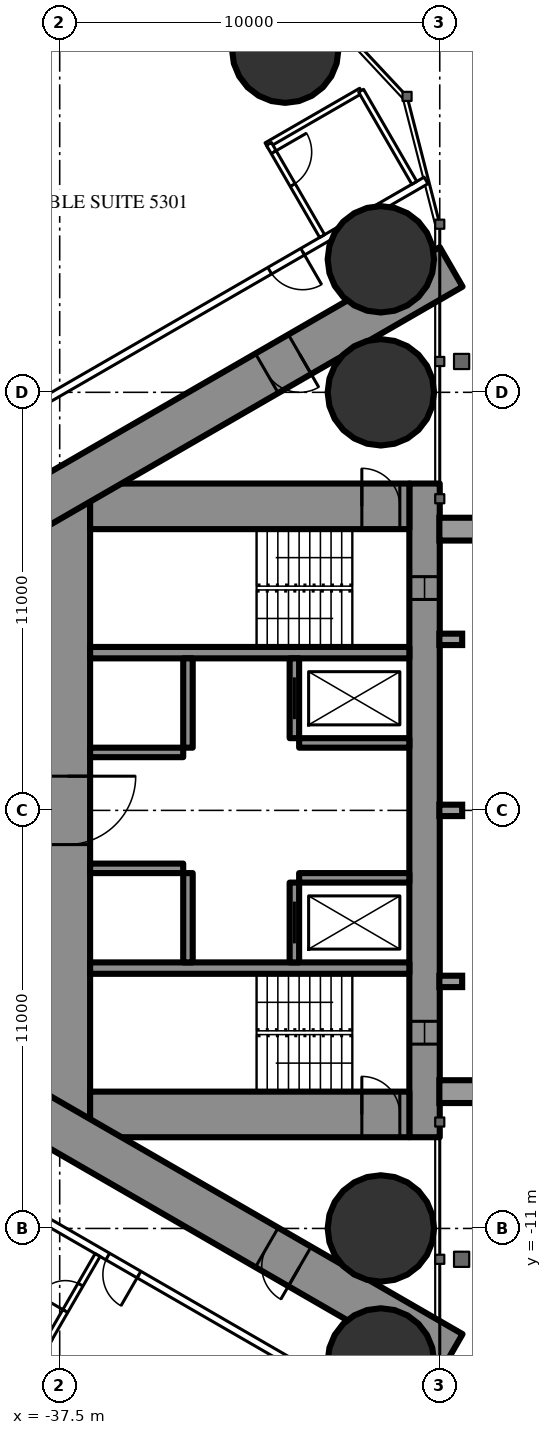
"""IFC4 building model, lengths in metres.
Left out: names, types, materials, properties, quantities, classifications, styles, units other than length and angle.
Written with IfcOpenShell. Run it as: python <this file> out.ifc"""

import sys

from ifc_helpers import new_model, si_unit, direction, frame, frame_2d, origin, origin_2d, place, context, subcontext, project, spatial, rectangle, circle, extrude, element, fill, save


model = new_model("IFC4")
c1 = context("Model", 3, precision=1e-05, world=origin(), true_north=direction((0.0, 1.0)))
c2 = subcontext(c1, "Body", "Model", "MODEL_VIEW")
j1 = project(units=[si_unit("LENGTHUNIT", "METRE"), si_unit("PLANEANGLEUNIT", "RADIAN")], contexts=[c1])
p1 = place(None, origin())
s1 = spatial("IfcSite", under=j1, at=p1, CompositionType="ELEMENT")
p2 = place(p1, origin())
s2 = spatial("IfcBuilding", under=s1, at=p2, CompositionType="ELEMENT")
p3 = place(p2, frame((0.0, 0.0, 198.3)))
s3 = spatial("IfcBuildingStorey", under=s2, at=p3, CompositionType="ELEMENT", Elevation=198.3)
for number, where, z_axis, x_axis in (
    (1, (-31.565, 20.016, 0.0), (0.0, 0.0, 1.0), (1.0, 0.0, 0.0)),
    (2, (-29.05, -11.0, 0.0), (0.0, 0.0, 1.0), (1.0, 0.0, 0.0)),
    (3, (-29.05, 11.0, 0.0), (0.0, 0.0, 1.0), (1.0, 0.0, 0.0)),
    (4, (-29.05, 14.5, 0.0), (0.0, 0.0, 1.0), (1.0, 0.0, 0.0)),
    (5, (-29.05, -14.5, 0.0), (0.0, 0.0, 1.0), (1.0, 0.0, 0.0)),
):
    element("IfcColumn", number, at=place(p3, frame(where, z_axis=z_axis, x_axis=x_axis)), inside=s3, PredefinedType="COLUMN", context=c2, shape_type="SweptSolid", body=[
        extrude(circle(Radius=1.4, at=origin_2d()), origin(), (0.0, 0.0, 1.0), 3.5),
    ])
p4 = place(p3, frame((-27.9, 8.6, 0.0), z_axis=(0.0, 0.0, 1.0), x_axis=(0.0, -1.0, 0.0)))
e6 = element("IfcWall", 6, at=p4, inside=s3, PredefinedType="SHEAR", context=c2, shape_type="SweptSolid", body=[
    extrude(rectangle(XDim=17.2, YDim=0.8, at=frame_2d((8.6, 0.0))), origin(), (0.0, 0.0, 1.0), 3.5),
])
p5 = place(p4, frame((2.45, 0.0, 0.6)))
e7 = element("IfcOpeningElement", 7, at=p5, cuts=e6, PredefinedType="OPENING", context=c2, shape_type="SweptSolid", body=[
    extrude(rectangle(XDim=0.6, YDim=2.1, at=frame_2d((0.3, 1.05))), frame((0.0, 0.41, 0.0), z_axis=(0.0, -1.0, 0.0), x_axis=(1.0, 0.0, 0.0)), (0.0, 0.0, 1.0), 0.82),
])
p6 = place(p4, frame((14.15, 0.0, 0.6)))
e8 = element("IfcOpeningElement", 8, at=p6, cuts=e6, PredefinedType="OPENING", context=c2, shape_type="SweptSolid", body=[
    extrude(rectangle(XDim=0.6, YDim=2.1, at=frame_2d((0.3, 1.05))), frame((0.0, 0.41, 0.0), z_axis=(0.0, -1.0, 0.0), x_axis=(1.0, 0.0, 0.0)), (0.0, 0.0, 1.0), 0.82),
])
p7 = place(p3, frame((-37.3, 8.6, 0.0), z_axis=(0.0, 0.0, 1.0), x_axis=(0.0, -1.0, 0.0)))
e9 = element("IfcWall", 9, at=p7, inside=s3, PredefinedType="SHEAR", context=c2, shape_type="SweptSolid", body=[
    extrude(rectangle(XDim=17.2, YDim=1.2, at=frame_2d((8.6, 0.0))), origin(), (0.0, 0.0, 1.0), 3.5),
])
p8 = place(p7, frame((7.7, 0.0, 0.0)))
e10 = element("IfcOpeningElement", 10, at=p8, cuts=e9, PredefinedType="OPENING", context=c2, shape_type="SweptSolid", body=[
    extrude(rectangle(XDim=1.8, YDim=2.2, at=frame_2d((0.9, 1.1))), frame((0.0, 0.61, 0.0), z_axis=(0.0, -1.0, 0.0), x_axis=(1.0, 0.0, 0.0)), (0.0, 0.0, 1.0), 1.22),
])
p9 = place(p3, frame((-28.3, 8.0, 0.0), z_axis=(0.0, 0.0, 1.0), x_axis=(-1.0, 0.0, 0.0)))
e11 = element("IfcWall", 11, at=p9, inside=s3, PredefinedType="SHEAR", context=c2, shape_type="SweptSolid", body=[
    extrude(rectangle(XDim=8.4, YDim=1.2, at=frame_2d((4.2, 0.0))), origin(), (0.0, 0.0, 1.0), 3.5),
])
p10 = place(p9, frame((0.25, 0.0, 0.0)))
e12 = element("IfcOpeningElement", 12, at=p10, cuts=e11, PredefinedType="OPENING", context=c2, shape_type="SweptSolid", body=[
    extrude(rectangle(XDim=1.0, YDim=2.2, at=frame_2d((0.5, 1.1))), frame((0.0, 0.61, 0.0), z_axis=(0.0, -1.0, 0.0), x_axis=(1.0, 0.0, 0.0)), (0.0, 0.0, 1.0), 1.22),
])
p11 = place(p3, frame((-28.3, -8.0, 0.0), z_axis=(0.0, 0.0, 1.0), x_axis=(-1.0, 0.0, 0.0)))
e13 = element("IfcWall", 13, at=p11, inside=s3, PredefinedType="SHEAR", context=c2, shape_type="SweptSolid", body=[
    extrude(rectangle(XDim=8.4, YDim=1.2, at=frame_2d((4.2, 0.0))), origin(), (0.0, 0.0, 1.0), 3.5),
])
p12 = place(p11, frame((0.25, 0.0, 0.0)))
e14 = element("IfcOpeningElement", 14, at=p12, cuts=e13, PredefinedType="OPENING", context=c2, shape_type="SweptSolid", body=[
    extrude(rectangle(XDim=1.0, YDim=2.2, at=frame_2d((0.5, 1.1))), frame((0.0, 0.61, 0.0), z_axis=(0.0, -1.0, 0.0), x_axis=(1.0, 0.0, 0.0)), (0.0, 0.0, 1.0), 1.22),
])
for number, where, z_axis, x_axis in (
    (15, (-28.3, 4.15, 0.0), (0.0, 0.0, 1.0), (-1.0, 0.0, 0.0)),
    (16, (-28.3, -4.15, 0.0), (0.0, 0.0, 1.0), (-1.0, 0.0, 0.0)),
):
    element("IfcWall", number, at=place(p3, frame(where, z_axis=z_axis, x_axis=x_axis)), inside=s3, PredefinedType="SHEAR", context=c2, shape_type="SweptSolid", body=[
        extrude(rectangle(XDim=8.4, YDim=0.3, at=frame_2d((4.2, 0.0))), origin(), (0.0, 0.0, 1.0), 3.5),
    ])
p13 = place(p3, frame((-31.325, 4.0, 0.0), z_axis=(0.0, 0.0, 1.0), x_axis=(0.0, -1.0, 0.0)))
e17 = element("IfcWall", 17, at=p13, inside=s3, PredefinedType="SHEAR", context=c2, shape_type="SweptSolid", body=[
    extrude(rectangle(XDim=2.1, YDim=0.25, at=frame_2d((1.05, 0.0))), origin(), (0.0, 0.0, 1.0), 3.5),
])
p14 = place(p13, frame((0.5, 0.0, 0.0)))
e18 = element("IfcOpeningElement", 18, at=p14, cuts=e17, PredefinedType="OPENING", context=c2, shape_type="SweptSolid", body=[
    extrude(rectangle(XDim=1.1, YDim=2.2, at=frame_2d((0.55, 1.1))), frame((0.0, 0.135, 0.0), z_axis=(0.0, -1.0, 0.0), x_axis=(1.0, 0.0, 0.0)), (0.0, 0.0, 1.0), 0.27),
])
p15 = place(p3, frame((-34.125, 4.0, 0.0), z_axis=(0.0, 0.0, 1.0), x_axis=(0.0, -1.0, 0.0)))
e19 = element("IfcWall", 19, at=p15, inside=s3, PredefinedType="SHEAR", context=c2, shape_type="SweptSolid", body=[
    extrude(rectangle(XDim=2.35, YDim=0.25, at=frame_2d((1.175, 0.0))), origin(), (0.0, 0.0, 1.0), 3.5),
])
p16 = place(p3, frame((-28.3, 1.775, 0.0), z_axis=(0.0, 0.0, 1.0), x_axis=(-1.0, 0.0, 0.0)))
e20 = element("IfcWall", 20, at=p16, inside=s3, PredefinedType="SHEAR", context=c2, shape_type="SweptSolid", body=[
    extrude(rectangle(XDim=2.9, YDim=0.25, at=frame_2d((1.45, 0.0))), origin(), (0.0, 0.0, 1.0), 3.5),
])
p17 = place(p3, frame((-34.25, 1.525, 0.0), z_axis=(0.0, 0.0, 1.0), x_axis=(-1.0, 0.0, 0.0)))
e21 = element("IfcWall", 21, at=p17, inside=s3, PredefinedType="SHEAR", context=c2, shape_type="SweptSolid", body=[
    extrude(rectangle(XDim=2.45, YDim=0.25, at=frame_2d((1.225, 0.0))), origin(), (0.0, 0.0, 1.0), 3.5),
])
p18 = place(p3, frame((-31.325, -1.9, 0.0), z_axis=(0.0, 0.0, 1.0), x_axis=(0.0, -1.0, 0.0)))
e22 = element("IfcWall", 22, at=p18, inside=s3, PredefinedType="SHEAR", context=c2, shape_type="SweptSolid", body=[
    extrude(rectangle(XDim=2.1, YDim=0.25, at=frame_2d((1.05, 0.0))), origin(), (0.0, 0.0, 1.0), 3.5),
])
p19 = place(p18, frame((0.5, 0.0, 0.0)))
e23 = element("IfcOpeningElement", 23, at=p19, cuts=e22, PredefinedType="OPENING", context=c2, shape_type="SweptSolid", body=[
    extrude(rectangle(XDim=1.1, YDim=2.2, at=frame_2d((0.55, 1.1))), frame((0.0, 0.135, 0.0), z_axis=(0.0, -1.0, 0.0), x_axis=(1.0, 0.0, 0.0)), (0.0, 0.0, 1.0), 0.27),
])
p20 = place(p3, frame((-34.125, -1.65, 0.0), z_axis=(0.0, 0.0, 1.0), x_axis=(0.0, -1.0, 0.0)))
e24 = element("IfcWall", 24, at=p20, inside=s3, PredefinedType="SHEAR", context=c2, shape_type="SweptSolid", body=[
    extrude(rectangle(XDim=2.35, YDim=0.25, at=frame_2d((1.175, 0.0))), origin(), (0.0, 0.0, 1.0), 3.5),
])
p21 = place(p3, frame((-28.3, -1.775, 0.0), z_axis=(0.0, 0.0, 1.0), x_axis=(-1.0, 0.0, 0.0)))
e25 = element("IfcWall", 25, at=p21, inside=s3, PredefinedType="SHEAR", context=c2, shape_type="SweptSolid", body=[
    extrude(rectangle(XDim=2.9, YDim=0.25, at=frame_2d((1.45, 0.0))), origin(), (0.0, 0.0, 1.0), 3.5),
])
p22 = place(p3, frame((-34.25, -1.525, 0.0), z_axis=(0.0, 0.0, 1.0), x_axis=(-1.0, 0.0, 0.0)))
e26 = element("IfcWall", 26, at=p22, inside=s3, PredefinedType="SHEAR", context=c2, shape_type="SweptSolid", body=[
    extrude(rectangle(XDim=2.45, YDim=0.25, at=frame_2d((1.225, 0.0))), origin(), (0.0, 0.0, 1.0), 3.5),
])
p23 = place(p3, frame((-27.2, 14.3, 0.0), z_axis=(0.0, 0.0, 1.0), x_axis=(-0.866026593062, -0.499997940104, 0.0)))
e27 = element("IfcWall", 27, at=p23, inside=s3, PredefinedType="SHEAR", context=c2, shape_type="SweptSolid", body=[
    extrude(rectangle(XDim=28.946, YDim=1.2, at=frame_2d((14.473, 0.0))), origin(), (0.0, 0.0, 1.0), 3.5),
])
p24 = place(p23, frame((4.6, 0.0, 0.0)))
e28 = element("IfcOpeningElement", 28, at=p24, cuts=e27, PredefinedType="OPENING", context=c2, shape_type="SweptSolid", body=[
    extrude(rectangle(XDim=1.0, YDim=2.2, at=frame_2d((0.5, 1.1))), frame((0.0, 0.61, 0.0), z_axis=(0.0, -1.0, 0.0), x_axis=(1.0, 0.0, 0.0)), (0.0, 0.0, 1.0), 1.22),
])
p25 = place(p23, frame((13.395, 0.0, 0.0)))
e29 = element("IfcOpeningElement", 29, at=p25, cuts=e27, PredefinedType="OPENING", context=c2, shape_type="SweptSolid", body=[
    extrude(rectangle(XDim=1.8, YDim=2.2, at=frame_2d((0.9, 1.1))), frame((0.0, 0.61, 0.0), z_axis=(0.0, -1.0, 0.0), x_axis=(1.0, 0.0, 0.0)), (0.0, 0.0, 1.0), 1.22),
])
p26 = place(p3, frame((-27.2, -14.3, 0.0), z_axis=(0.0, 0.0, 1.0), x_axis=(-0.866024021859, 0.500002393557, 0.0)))
e30 = element("IfcWall", 30, at=p26, inside=s3, PredefinedType="SHEAR", context=c2, shape_type="SweptSolid", body=[
    extrude(rectangle(XDim=27.907, YDim=1.2, at=frame_2d((13.954, 0.0))), origin(), (0.0, 0.0, 1.0), 3.5),
])
p27 = place(p26, frame((4.6, 0.0, 0.0)))
e31 = element("IfcOpeningElement", 31, at=p27, cuts=e30, PredefinedType="OPENING", context=c2, shape_type="SweptSolid", body=[
    extrude(rectangle(XDim=1.0, YDim=2.2, at=frame_2d((0.5, 1.1))), frame((0.0, 0.61, 0.0), z_axis=(0.0, -1.0, 0.0), x_axis=(1.0, 0.0, 0.0)), (0.0, 0.0, 1.0), 1.22),
])
p28 = place(p26, frame((13.395, 0.0, 0.0)))
e32 = element("IfcOpeningElement", 32, at=p28, cuts=e30, PredefinedType="OPENING", context=c2, shape_type="SweptSolid", body=[
    extrude(rectangle(XDim=1.8, YDim=2.2, at=frame_2d((0.9, 1.1))), frame((0.0, 0.61, 0.0), z_axis=(0.0, -1.0, 0.0), x_axis=(1.0, 0.0, 0.0)), (0.0, 0.0, 1.0), 1.22),
])
p29 = place(p3, frame((-27.86, 16.575, 0.0), z_axis=(0.0, 0.0, 1.0), x_axis=(-0.866025533911, -0.499999774615, 0.0)))
e33 = element("IfcWall", 33, at=p29, inside=s3, PredefinedType="PARTITIONING", context=c2, shape_type="SweptSolid", body=[
    extrude(rectangle(XDim=33.149, YDim=0.2, at=frame_2d((16.575, 0.0))), origin(), (0.0, 0.0, 1.0), 3.25),
])
p30 = place(p29, frame((3.75, 0.0, 0.0)))
e34 = element("IfcOpeningElement", 34, at=p30, cuts=e33, PredefinedType="OPENING", context=c2, shape_type="SweptSolid", body=[
    extrude(rectangle(XDim=1.0, YDim=2.2, at=frame_2d((0.5, 1.1))), frame((0.0, 0.11, 0.0), z_axis=(0.0, -1.0, 0.0), x_axis=(1.0, 0.0, 0.0)), (0.0, 0.0, 1.0), 0.22),
])
p31 = place(p29, frame((16.402, 0.0, 0.0)))
e35 = element("IfcOpeningElement", 35, at=p31, cuts=e33, PredefinedType="OPENING", context=c2, shape_type="SweptSolid", body=[
    extrude(rectangle(XDim=0.95, YDim=2.2, at=frame_2d((0.475, 1.1))), frame((0.0, 0.11, 0.0), z_axis=(0.0, -1.0, 0.0), x_axis=(1.0, 0.0, 0.0)), (0.0, 0.0, 1.0), 0.22),
])
p32 = place(p29, frame((22.047, 0.0, 0.0)))
e36 = element("IfcOpeningElement", 36, at=p32, cuts=e33, PredefinedType="OPENING", context=c2, shape_type="SweptSolid", body=[
    extrude(rectangle(XDim=0.95, YDim=2.2, at=frame_2d((0.475, 1.1))), frame((0.0, 0.11, 0.0), z_axis=(0.0, -1.0, 0.0), x_axis=(1.0, 0.0, 0.0)), (0.0, 0.0, 1.0), 0.22),
])
p33 = place(p29, frame((30.396, 0.0, 0.0)))
e37 = element("IfcOpeningElement", 37, at=p33, cuts=e33, PredefinedType="OPENING", context=c2, shape_type="SweptSolid", body=[
    extrude(rectangle(XDim=1.8, YDim=2.2, at=frame_2d((0.9, 1.1))), frame((0.0, 0.11, 0.0), z_axis=(0.0, -1.0, 0.0), x_axis=(1.0, 0.0, 0.0)), (0.0, 0.0, 1.0), 0.22),
])
p34 = place(p3, frame((-27.86, -16.575, 0.0), z_axis=(0.0, 0.0, 1.0), x_axis=(-0.866027756871, 0.499995924312, 0.0)))
e38 = element("IfcWall", 38, at=p34, inside=s3, PredefinedType="PARTITIONING", context=c2, shape_type="SweptSolid", body=[
    extrude(rectangle(XDim=12.622, YDim=0.2, at=frame_2d((6.311, 0.0))), origin(), (0.0, 0.0, 1.0), 3.25),
])
p35 = place(p34, frame((8.722, 0.0, 0.0)))
e39 = element("IfcOpeningElement", 39, at=p35, cuts=e38, PredefinedType="OPENING", context=c2, shape_type="SweptSolid", body=[
    extrude(rectangle(XDim=0.95, YDim=2.2, at=frame_2d((0.475, 1.1))), frame((0.0, 0.11, 0.0), z_axis=(0.0, -1.0, 0.0), x_axis=(1.0, 0.0, 0.0)), (0.0, 0.0, 1.0), 0.22),
])
p36 = place(p3, frame((-29.57, 18.936, 0.0), z_axis=(0.0, 0.0, 1.0), x_axis=(-0.866018712932, -0.500011588718, 0.0)))
e40 = element("IfcWall", 40, at=p36, inside=s3, PredefinedType="PARTITIONING", context=c2, shape_type="SweptSolid", body=[
    extrude(rectangle(XDim=2.875, YDim=0.15, at=frame_2d((1.438, 0.0))), origin(), (0.0, 0.0, 1.0), 3.25),
])
p37 = place(p3, frame((-30.595, 15.111, 0.0), z_axis=(0.0, 0.0, 1.0), x_axis=(-0.49998411664, 0.866034573852, 0.0)))
e41 = element("IfcWall", 41, at=p37, inside=s3, PredefinedType="PARTITIONING", context=c2, shape_type="SweptSolid", body=[
    extrude(rectangle(XDim=2.8, YDim=0.15, at=frame_2d((1.4, 0.0))), origin(), (0.0, 0.0, 1.0), 3.25),
])
p38 = place(p37, frame((1.55, 0.0, 0.0)))
e42 = element("IfcOpeningElement", 42, at=p38, cuts=e41, PredefinedType="OPENING", context=c2, shape_type="SweptSolid", body=[
    extrude(rectangle(XDim=1.0, YDim=2.2, at=frame_2d((0.5, 1.1))), frame((0.0, 0.085, 0.0), z_axis=(0.0, -1.0, 0.0), x_axis=(1.0, 0.0, 0.0)), (0.0, 0.0, 1.0), 0.17),
])
p39 = place(p3, frame((-28.17, 16.511, 0.0), z_axis=(0.0, 0.0, 1.0), x_axis=(-0.49994636267, 0.866056369097, 0.0)))
e43 = element("IfcWall", 43, at=p39, inside=s3, PredefinedType="PARTITIONING", context=c2, shape_type="SweptSolid", body=[
    extrude(rectangle(XDim=2.8, YDim=0.15, at=frame_2d((1.4, 0.0))), origin(), (0.0, 0.0, 1.0), 3.25),
])
p40 = place(p3, frame((-36.503, -11.7, 0.0), z_axis=(0.0, 0.0, 1.0), x_axis=(-0.500006934395, -0.866021400173, 0.0)))
e44 = element("IfcWall", 44, at=p40, inside=s3, PredefinedType="PARTITIONING", context=c2, shape_type="SweptSolid", body=[
    extrude(rectangle(XDim=2.6, YDim=0.15, at=frame_2d((1.3, 0.0))), origin(), (0.0, 0.0, 1.0), 3.25),
])
p41 = place(p40, frame((0.9, 0.0, 0.0)))
e45 = element("IfcOpeningElement", 45, at=p41, cuts=e44, PredefinedType="OPENING", context=c2, shape_type="SweptSolid", body=[
    extrude(rectangle(XDim=0.8, YDim=2.2, at=frame_2d((0.4, 1.1))), frame((0.0, 0.085, 0.0), z_axis=(0.0, -1.0, 0.0), x_axis=(1.0, 0.0, 0.0)), (0.0, 0.0, 1.0), 0.17),
])
p42 = place(p38, origin())
e46 = element("IfcDoor", 46, at=p42, inside=s3, OperationType="SINGLE_SWING_RIGHT", PredefinedType="DOOR", context=c2, shape_type="SweptSolid", body=[
    extrude(rectangle(XDim=1.0, YDim=2.2, at=frame_2d((0.5, 1.1))), frame((0.0, 0.025, 0.0), z_axis=(0.0, -1.0, 0.0), x_axis=(1.0, 0.0, 0.0)), (0.0, 0.0, 1.0), 0.05),
])
fill(e42, e46)
p43 = place(p30, origin())
e47 = element("IfcDoor", 47, at=p43, inside=s3, OperationType="SINGLE_SWING_LEFT", PredefinedType="DOOR", context=c2, shape_type="SweptSolid", body=[
    extrude(rectangle(XDim=1.0, YDim=2.2, at=frame_2d((0.5, 1.1))), frame((0.0, 0.025, 0.0), z_axis=(0.0, -1.0, 0.0), x_axis=(1.0, 0.0, 0.0)), (0.0, 0.0, 1.0), 0.05),
])
fill(e34, e47)
p44 = place(p41, origin())
e48 = element("IfcDoor", 48, at=p44, inside=s3, OperationType="SINGLE_SWING_RIGHT", PredefinedType="DOOR", context=c2, shape_type="SweptSolid", body=[
    extrude(rectangle(XDim=0.8, YDim=2.2, at=frame_2d((0.4, 1.1))), frame((0.0, 0.025, 0.0), z_axis=(0.0, -1.0, 0.0), x_axis=(1.0, 0.0, 0.0)), (0.0, 0.0, 1.0), 0.05),
])
fill(e45, e48)
p45 = place(p35, origin())
e49 = element("IfcDoor", 49, at=p45, inside=s3, OperationType="SINGLE_SWING_LEFT", PredefinedType="DOOR", context=c2, shape_type="SweptSolid", body=[
    extrude(rectangle(XDim=0.95, YDim=2.2, at=frame_2d((0.475, 1.1))), frame((0.0, 0.025, 0.0), z_axis=(0.0, -1.0, 0.0), x_axis=(1.0, 0.0, 0.0)), (0.0, 0.0, 1.0), 0.05),
])
fill(e39, e49)
p46 = place(p24, origin())
e50 = element("IfcDoor", 50, at=p46, inside=s3, OperationType="SINGLE_SWING_LEFT", PredefinedType="DOOR", context=c2, shape_type="SweptSolid", body=[
    extrude(rectangle(XDim=1.0, YDim=2.2, at=frame_2d((0.5, 1.1))), frame((0.0, 0.025, 0.0), z_axis=(0.0, -1.0, 0.0), x_axis=(1.0, 0.0, 0.0)), (0.0, 0.0, 1.0), 0.05),
])
fill(e28, e50)
p47 = place(p27, origin())
e51 = element("IfcDoor", 51, at=p47, inside=s3, OperationType="SINGLE_SWING_LEFT", PredefinedType="DOOR", context=c2, shape_type="SweptSolid", body=[
    extrude(rectangle(XDim=1.0, YDim=2.2, at=frame_2d((0.5, 1.1))), frame((0.0, 0.025, 0.0), z_axis=(0.0, -1.0, 0.0), x_axis=(1.0, 0.0, 0.0)), (0.0, 0.0, 1.0), 0.05),
])
fill(e31, e51)
p48 = place(p8, origin())
e52 = element("IfcDoor", 52, at=p48, inside=s3, OperationType="DOUBLE_DOOR_SINGLE_SWING", PredefinedType="DOOR", context=c2, shape_type="SweptSolid", body=[
    extrude(rectangle(XDim=1.8, YDim=2.2, at=frame_2d((0.9, 1.1))), frame((0.0, 0.025, 0.0), z_axis=(0.0, -1.0, 0.0), x_axis=(1.0, 0.0, 0.0)), (0.0, 0.0, 1.0), 0.05),
])
fill(e10, e52)
p49 = place(p10, origin())
e53 = element("IfcDoor", 53, at=p49, inside=s3, OperationType="SINGLE_SWING_RIGHT", PredefinedType="DOOR", context=c2, shape_type="SweptSolid", body=[
    extrude(rectangle(XDim=1.0, YDim=2.2, at=frame_2d((0.5, 1.1))), frame((0.0, 0.025, 0.0), z_axis=(0.0, -1.0, 0.0), x_axis=(1.0, 0.0, 0.0)), (0.0, 0.0, 1.0), 0.05),
])
fill(e12, e53)
p50 = place(p12, origin())
e54 = element("IfcDoor", 54, at=p50, inside=s3, OperationType="SINGLE_SWING_RIGHT", PredefinedType="DOOR", context=c2, shape_type="SweptSolid", body=[
    extrude(rectangle(XDim=1.0, YDim=2.2, at=frame_2d((0.5, 1.1))), frame((0.0, 0.025, 0.0), z_axis=(0.0, -1.0, 0.0), x_axis=(1.0, 0.0, 0.0)), (0.0, 0.0, 1.0), 0.05),
])
fill(e14, e54)
p51 = place(p14, origin())
e55 = element("IfcDoor", 55, at=p51, inside=s3, OperationType="SLIDING_TO_LEFT", PredefinedType="USERDEFINED", context=c2, shape_type="SweptSolid", body=[
    extrude(rectangle(XDim=1.1, YDim=2.2, at=frame_2d((0.55, 1.1))), frame((0.0, 0.025, 0.0), z_axis=(0.0, -1.0, 0.0), x_axis=(1.0, 0.0, 0.0)), (0.0, 0.0, 1.0), 0.05),
])
fill(e18, e55)
p52 = place(p19, origin())
e56 = element("IfcDoor", 56, at=p52, inside=s3, OperationType="SLIDING_TO_LEFT", PredefinedType="USERDEFINED", context=c2, shape_type="SweptSolid", body=[
    extrude(rectangle(XDim=1.1, YDim=2.2, at=frame_2d((0.55, 1.1))), frame((0.0, 0.025, 0.0), z_axis=(0.0, -1.0, 0.0), x_axis=(1.0, 0.0, 0.0)), (0.0, 0.0, 1.0), 0.05),
])
fill(e23, e56)
p53 = place(p5, origin())
e57 = element("IfcWindow", 57, at=p53, inside=s3, PartitioningType="SINGLE_PANEL", PredefinedType="WINDOW", context=c2, shape_type="SweptSolid", body=[
    extrude(rectangle(XDim=0.6, YDim=2.1, at=frame_2d((0.3, 1.05))), frame((0.0, 0.03, 0.0), z_axis=(0.0, -1.0, 0.0), x_axis=(1.0, 0.0, 0.0)), (0.0, 0.0, 1.0), 0.06),
])
fill(e7, e57)
p54 = place(p6, origin())
e58 = element("IfcWindow", 58, at=p54, inside=s3, PartitioningType="SINGLE_PANEL", PredefinedType="WINDOW", context=c2, shape_type="SweptSolid", body=[
    extrude(rectangle(XDim=0.6, YDim=2.1, at=frame_2d((0.3, 1.05))), frame((0.0, 0.03, 0.0), z_axis=(0.0, -1.0, 0.0), x_axis=(1.0, 0.0, 0.0)), (0.0, 0.0, 1.0), 0.06),
])
fill(e8, e58)
save(model, sys.argv[1])
